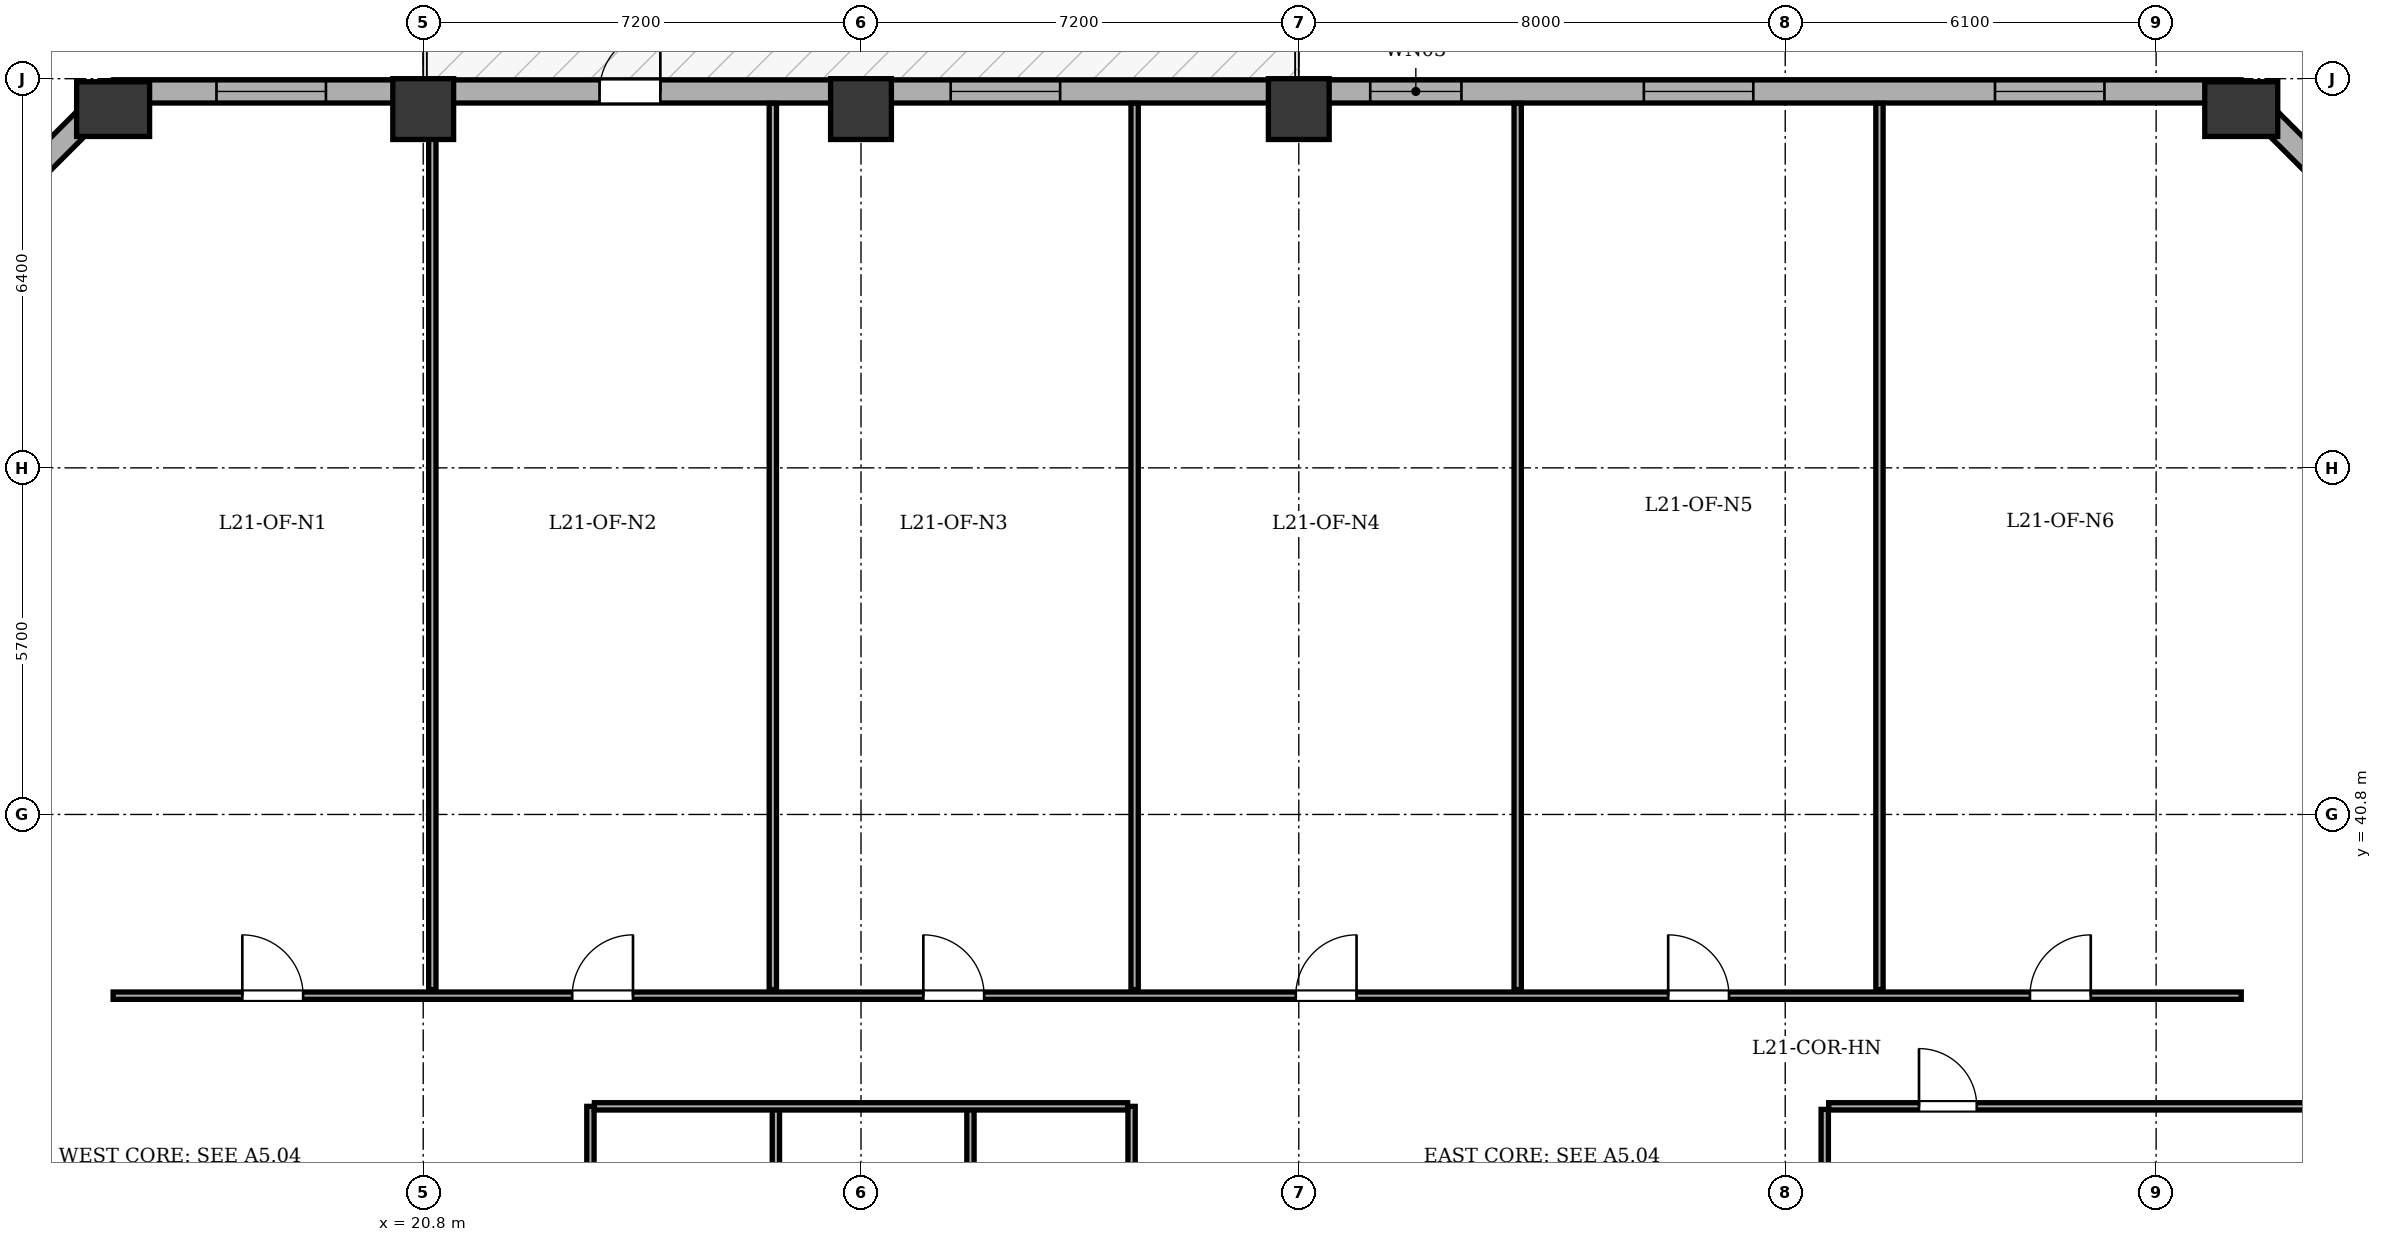
"""IFC4 building model, lengths in metres.
Left out: names, types, materials, properties, quantities, classifications, styles, units other than length and angle.
Written with IfcOpenShell. Run it as: python <this file> out.ifc"""

import sys

from ifc_helpers import new_model, si_unit, direction, frame, frame_2d, origin, origin_2d, place, context, subcontext, project, spatial, rectangle, extrude, element, fill, save


model = new_model("IFC4")
c1 = context("Model", 3, precision=1e-05, world=origin(), true_north=direction((0.0, 1.0)))
c2 = subcontext(c1, "Body", "Model", "MODEL_VIEW")
j1 = project(units=[si_unit("LENGTHUNIT", "METRE"), si_unit("PLANEANGLEUNIT", "RADIAN")], contexts=[c1])
p1 = place(None, origin())
s1 = spatial("IfcSite", under=j1, at=p1, CompositionType="ELEMENT")
p2 = place(p1, origin())
s2 = spatial("IfcBuilding", under=s1, at=p2, CompositionType="ELEMENT")
p3 = place(p2, frame((0.0, 0.0, 86.7)))
s3 = spatial("IfcBuildingStorey", under=s2, at=p3, CompositionType="ELEMENT", Elevation=86.7)
p4 = place(p3, frame((15.7, 52.4, 0.0), z_axis=(0.0, 0.0, 1.0), x_axis=(1.0, 0.0, 0.0)))
e1 = element("IfcColumn", 1, at=p4, inside=s3, PredefinedType="COLUMN", context=c2, shape_type="SweptSolid", body=[
    extrude(rectangle(XDim=0.9, YDim=1.2, at=origin_2d()), origin(), (0.0, 0.0, 1.0), 3.9),
])
for number, where, z_axis, x_axis in (
    (2, (20.8, 52.4, 0.0), (0.0, 0.0, 1.0), (1.0, 0.0, 0.0)),
    (3, (28.0, 52.4, 0.0), (0.0, 0.0, 1.0), (1.0, 0.0, 0.0)),
    (4, (35.2, 52.4, 0.0), (0.0, 0.0, 1.0), (1.0, 0.0, 0.0)),
):
    element("IfcColumn", number, at=place(p3, frame(where, z_axis=z_axis, x_axis=x_axis)), inside=s3, PredefinedType="COLUMN", context=c2, shape_type="SweptSolid", body=[
        extrude(rectangle(XDim=1.0, YDim=1.0, at=origin_2d()), origin(), (0.0, 0.0, 1.0), 3.9),
    ])
p5 = place(p3, frame((50.7, 52.4, 0.0), z_axis=(0.0, 0.0, 1.0), x_axis=(1.0, 0.0, 0.0)))
e5 = element("IfcColumn", 5, at=p5, inside=s3, PredefinedType="COLUMN", context=c2, shape_type="SweptSolid", body=[
    extrude(rectangle(XDim=0.9, YDim=1.2, at=origin_2d()), origin(), (0.0, 0.0, 1.0), 3.9),
])
p6 = place(p3, frame((10.91, 47.9, 0.0), z_axis=(0.0, 0.0, 1.0), x_axis=(0.707106781187, 0.707106781187, 0.0)))
e6 = element("IfcWall", 6, at=p6, inside=s3, PredefinedType="STANDARD", context=c2, shape_type="SweptSolid", body=[
    extrude(rectangle(XDim=6.774, YDim=0.38, at=frame_2d((3.387, 0.0))), origin(), (0.0, 0.0, 1.0), 3.135),
])
p7 = place(p6, frame((2.687, 0.0, 0.8)))
e7 = element("IfcOpeningElement", 7, at=p7, cuts=e6, PredefinedType="OPENING", context=c2, shape_type="SweptSolid", body=[
    extrude(rectangle(XDim=1.4, YDim=1.65, at=frame_2d((0.7, 0.825))), frame((0.0, 0.2, 0.0), z_axis=(0.0, -1.0, 0.0), x_axis=(1.0, 0.0, 0.0)), (0.0, 0.0, 1.0), 0.4),
])
p8 = place(p3, frame((15.7, 52.69, 0.0), z_axis=(0.0, 0.0, 1.0), x_axis=(1.0, 0.0, 0.0)))
e8 = element("IfcWall", 8, at=p8, inside=s3, PredefinedType="STANDARD", context=c2, shape_type="SweptSolid", body=[
    extrude(rectangle(XDim=35.0, YDim=0.38, at=frame_2d((17.5, 0.0))), origin(), (0.0, 0.0, 1.0), 3.135),
])
p9 = place(p8, frame((8.0, 0.0, 0.0)))
e9 = element("IfcOpeningElement", 9, at=p9, cuts=e8, PredefinedType="OPENING", context=c2, shape_type="SweptSolid", body=[
    extrude(rectangle(XDim=1.0, YDim=2.02, at=frame_2d((0.5, 1.01))), frame((0.0, 0.2, 0.0), z_axis=(0.0, -1.0, 0.0), x_axis=(1.0, 0.0, 0.0)), (0.0, 0.0, 1.0), 0.4),
])
p10 = place(p8, frame((1.7, 0.0, 0.8)))
e10 = element("IfcOpeningElement", 10, at=p10, cuts=e8, PredefinedType="OPENING", context=c2, shape_type="SweptSolid", body=[
    extrude(rectangle(XDim=1.8, YDim=1.9, at=frame_2d((0.9, 0.95))), frame((0.0, 0.2, 0.0), z_axis=(0.0, -1.0, 0.0), x_axis=(1.0, 0.0, 0.0)), (0.0, 0.0, 1.0), 0.4),
])
p11 = place(p8, frame((13.775, 0.0, 0.8)))
e11 = element("IfcOpeningElement", 11, at=p11, cuts=e8, PredefinedType="OPENING", context=c2, shape_type="SweptSolid", body=[
    extrude(rectangle(XDim=1.8, YDim=1.9, at=frame_2d((0.9, 0.95))), frame((0.0, 0.2, 0.0), z_axis=(0.0, -1.0, 0.0), x_axis=(1.0, 0.0, 0.0)), (0.0, 0.0, 1.0), 0.4),
])
p12 = place(p8, frame((20.675, 0.0, 0.8)))
e12 = element("IfcOpeningElement", 12, at=p12, cuts=e8, PredefinedType="OPENING", context=c2, shape_type="SweptSolid", body=[
    extrude(rectangle(XDim=1.5, YDim=1.9, at=frame_2d((0.75, 0.95))), frame((0.0, 0.2, 0.0), z_axis=(0.0, -1.0, 0.0), x_axis=(1.0, 0.0, 0.0)), (0.0, 0.0, 1.0), 0.4),
])
p13 = place(p8, frame((25.175, 0.0, 0.8)))
e13 = element("IfcOpeningElement", 13, at=p13, cuts=e8, PredefinedType="OPENING", context=c2, shape_type="SweptSolid", body=[
    extrude(rectangle(XDim=1.8, YDim=1.9, at=frame_2d((0.9, 0.95))), frame((0.0, 0.2, 0.0), z_axis=(0.0, -1.0, 0.0), x_axis=(1.0, 0.0, 0.0)), (0.0, 0.0, 1.0), 0.4),
])
p14 = place(p8, frame((30.95, 0.0, 0.8)))
e14 = element("IfcOpeningElement", 14, at=p14, cuts=e8, PredefinedType="OPENING", context=c2, shape_type="SweptSolid", body=[
    extrude(rectangle(XDim=1.8, YDim=1.9, at=frame_2d((0.9, 0.95))), frame((0.0, 0.2, 0.0), z_axis=(0.0, -1.0, 0.0), x_axis=(1.0, 0.0, 0.0)), (0.0, 0.0, 1.0), 0.4),
])
p15 = place(p3, frame((50.7, 52.69, 0.0), z_axis=(0.0, 0.0, 1.0), x_axis=(0.707106781187, -0.707106781187, 0.0)))
e15 = element("IfcWall", 15, at=p15, inside=s3, PredefinedType="STANDARD", context=c2, shape_type="SweptSolid", body=[
    extrude(rectangle(XDim=6.774, YDim=0.38, at=frame_2d((3.387, 0.0))), origin(), (0.0, 0.0, 1.0), 3.135),
])
p16 = place(p15, frame((2.687, 0.0, 0.8)))
e16 = element("IfcOpeningElement", 16, at=p16, cuts=e15, PredefinedType="OPENING", context=c2, shape_type="SweptSolid", body=[
    extrude(rectangle(XDim=1.4, YDim=1.65, at=frame_2d((0.7, 0.825))), frame((0.0, 0.2, 0.0), z_axis=(0.0, -1.0, 0.0), x_axis=(1.0, 0.0, 0.0)), (0.0, 0.0, 1.0), 0.4),
])
for number, where, z_axis, x_axis in (
    (17, (23.55, 24.715, 0.0), (0.0, 0.0, 1.0), (0.0, 1.0, 0.0)),
    (18, (32.45, 24.715, 0.0), (0.0, 0.0, 1.0), (0.0, 1.0, 0.0)),
    (19, (26.6, 24.715, 0.0), (0.0, 0.0, 1.0), (0.0, 1.0, 0.0)),
):
    element("IfcWall", number, at=place(p3, frame(where, z_axis=z_axis, x_axis=x_axis)), inside=s3, PredefinedType="PARTITIONING", context=c2, shape_type="SweptSolid", body=[
        extrude(rectangle(XDim=11.285, YDim=0.12, at=frame_2d((5.643, 0.0))), origin(), (0.0, 0.0, 1.0), 3.6),
    ])
p17 = place(p3, frame((29.8, 24.715, 0.0), z_axis=(0.0, 0.0, 1.0), x_axis=(0.0, 1.0, 0.0)))
e20 = element("IfcWall", 20, at=p17, inside=s3, PredefinedType="PARTITIONING", context=c2, shape_type="SweptSolid", body=[
    extrude(rectangle(XDim=11.285, YDim=0.12, at=frame_2d((5.643, 0.0))), origin(), (0.0, 0.0, 1.0), 3.135),
])
p18 = place(p3, frame((23.615, 36.0, 0.0), z_axis=(0.0, 0.0, 1.0), x_axis=(1.0, 0.0, 0.0)))
e21 = element("IfcWall", 21, at=p18, inside=s3, PredefinedType="PARTITIONING", context=c2, shape_type="SweptSolid", body=[
    extrude(rectangle(XDim=8.77, YDim=0.12, at=frame_2d((4.385, 0.0))), origin(), (0.0, 0.0, 1.0), 3.6),
])
p19 = place(p3, frame((15.7, 37.82, 0.0), z_axis=(0.0, 0.0, 1.0), x_axis=(1.0, 0.0, 0.0)))
e22 = element("IfcWall", 22, at=p19, inside=s3, PredefinedType="PARTITIONING", context=c2, shape_type="SweptSolid", body=[
    extrude(rectangle(XDim=35.0, YDim=0.12, at=frame_2d((17.5, 0.0))), origin(), (0.0, 0.0, 1.0), 3.6),
])
p20 = place(p19, frame((2.125, 0.0, 0.0)))
e23 = element("IfcOpeningElement", 23, at=p20, cuts=e22, PredefinedType="OPENING", context=c2, shape_type="SweptSolid", body=[
    extrude(rectangle(XDim=1.0, YDim=2.1, at=frame_2d((0.5, 1.05))), frame((0.0, 0.07, 0.0), z_axis=(0.0, -1.0, 0.0), x_axis=(1.0, 0.0, 0.0)), (0.0, 0.0, 1.0), 0.14),
])
p21 = place(p19, frame((7.55, 0.0, 0.0)))
e24 = element("IfcOpeningElement", 24, at=p21, cuts=e22, PredefinedType="OPENING", context=c2, shape_type="SweptSolid", body=[
    extrude(rectangle(XDim=1.0, YDim=2.1, at=frame_2d((0.5, 1.05))), frame((0.0, 0.07, 0.0), z_axis=(0.0, -1.0, 0.0), x_axis=(1.0, 0.0, 0.0)), (0.0, 0.0, 1.0), 0.14),
])
p22 = place(p19, frame((13.325, 0.0, 0.0)))
e25 = element("IfcOpeningElement", 25, at=p22, cuts=e22, PredefinedType="OPENING", context=c2, shape_type="SweptSolid", body=[
    extrude(rectangle(XDim=1.0, YDim=2.1, at=frame_2d((0.5, 1.05))), frame((0.0, 0.07, 0.0), z_axis=(0.0, -1.0, 0.0), x_axis=(1.0, 0.0, 0.0)), (0.0, 0.0, 1.0), 0.14),
])
p23 = place(p19, frame((19.45, 0.0, 0.0)))
e26 = element("IfcOpeningElement", 26, at=p23, cuts=e22, PredefinedType="OPENING", context=c2, shape_type="SweptSolid", body=[
    extrude(rectangle(XDim=1.0, YDim=2.1, at=frame_2d((0.5, 1.05))), frame((0.0, 0.07, 0.0), z_axis=(0.0, -1.0, 0.0), x_axis=(1.0, 0.0, 0.0)), (0.0, 0.0, 1.0), 0.14),
])
p24 = place(p19, frame((25.575, 0.0, 0.0)))
e27 = element("IfcOpeningElement", 27, at=p24, cuts=e22, PredefinedType="OPENING", context=c2, shape_type="SweptSolid", body=[
    extrude(rectangle(XDim=1.0, YDim=2.1, at=frame_2d((0.5, 1.05))), frame((0.0, 0.07, 0.0), z_axis=(0.0, -1.0, 0.0), x_axis=(1.0, 0.0, 0.0)), (0.0, 0.0, 1.0), 0.14),
])
p25 = place(p19, frame((31.525, 0.0, 0.0)))
e28 = element("IfcOpeningElement", 28, at=p25, cuts=e22, PredefinedType="OPENING", context=c2, shape_type="SweptSolid", body=[
    extrude(rectangle(XDim=1.0, YDim=2.1, at=frame_2d((0.5, 1.05))), frame((0.0, 0.07, 0.0), z_axis=(0.0, -1.0, 0.0), x_axis=(1.0, 0.0, 0.0)), (0.0, 0.0, 1.0), 0.14),
])
p26 = place(p3, frame((20.95, 37.92, 0.0), z_axis=(0.0, 0.0, 1.0), x_axis=(0.0, 1.0, 0.0)))
e29 = element("IfcWall", 29, at=p26, inside=s3, PredefinedType="PARTITIONING", context=c2, shape_type="SweptSolid", body=[
    extrude(rectangle(XDim=14.575, YDim=0.12, at=frame_2d((7.288, 0.0))), origin(), (0.0, 0.0, 1.0), 2.835),
])
for number, where, z_axis, x_axis in (
    (30, (26.55, 37.92, 0.0), (0.0, 0.0, 1.0), (0.0, 1.0, 0.0)),
    (31, (32.5, 37.92, 0.0), (0.0, 0.0, 1.0), (0.0, 1.0, 0.0)),
    (32, (38.8, 37.92, 0.0), (0.0, 0.0, 1.0), (0.0, 1.0, 0.0)),
    (33, (44.75, 37.92, 0.0), (0.0, 0.0, 1.0), (0.0, 1.0, 0.0)),
):
    element("IfcWall", number, at=place(p3, frame(where, z_axis=z_axis, x_axis=x_axis)), inside=s3, PredefinedType="PARTITIONING", context=c2, shape_type="SweptSolid", body=[
        extrude(rectangle(XDim=14.575, YDim=0.12, at=frame_2d((7.288, 0.0))), origin(), (0.0, 0.0, 1.0), 3.6),
    ])
p27 = place(p3, frame((43.85, 18.45, 0.0), z_axis=(0.0, 0.0, 1.0), x_axis=(0.0, 1.0, 0.0)))
e34 = element("IfcWall", 34, at=p27, inside=s3, PredefinedType="PARTITIONING", context=c2, shape_type="SweptSolid", body=[
    extrude(rectangle(XDim=17.5, YDim=0.12, at=frame_2d((8.75, 0.0))), origin(), (0.0, 0.0, 1.0), 3.6),
])
p28 = place(p3, frame((43.915, 36.0, 0.0), z_axis=(0.0, 0.0, 1.0), x_axis=(1.0, 0.0, 0.0)))
e35 = element("IfcWall", 35, at=p28, inside=s3, PredefinedType="PARTITIONING", context=c2, shape_type="SweptSolid", body=[
    extrude(rectangle(XDim=11.38, YDim=0.12, at=frame_2d((5.69, 0.0))), origin(), (0.0, 0.0, 1.0), 3.6),
])
p29 = place(p28, frame((1.485, 0.0, 0.0)))
e36 = element("IfcOpeningElement", 36, at=p29, cuts=e35, PredefinedType="OPENING", context=c2, shape_type="SweptSolid", body=[
    extrude(rectangle(XDim=0.95, YDim=2.1, at=frame_2d((0.475, 1.05))), frame((0.0, 0.07, 0.0), z_axis=(0.0, -1.0, 0.0), x_axis=(1.0, 0.0, 0.0)), (0.0, 0.0, 1.0), 0.14),
])
p30 = place(p9, origin())
e37 = element("IfcDoor", 37, at=p30, inside=s3, OperationType="SINGLE_SWING_RIGHT", PredefinedType="DOOR", context=c2, shape_type="SweptSolid", body=[
    extrude(rectangle(XDim=1.0, YDim=2.02, at=frame_2d((0.5, 1.01))), frame((0.0, 0.025, 0.0), z_axis=(0.0, -1.0, 0.0), x_axis=(1.0, 0.0, 0.0)), (0.0, 0.0, 1.0), 0.05),
])
fill(e9, e37)
p31 = place(p10, origin())
e38 = element("IfcWindow", 38, at=p31, inside=s3, PartitioningType="SINGLE_PANEL", PredefinedType="WINDOW", context=c2, shape_type="SweptSolid", body=[
    extrude(rectangle(XDim=1.8, YDim=1.9, at=frame_2d((0.9, 0.95))), frame((0.0, -0.01, 0.0), z_axis=(0.0, -1.0, 0.0), x_axis=(1.0, 0.0, 0.0)), (0.0, 0.0, 1.0), 0.06),
])
fill(e10, e38)
p32 = place(p11, origin())
e39 = element("IfcWindow", 39, at=p32, inside=s3, PartitioningType="SINGLE_PANEL", PredefinedType="WINDOW", context=c2, shape_type="SweptSolid", body=[
    extrude(rectangle(XDim=1.8, YDim=1.9, at=frame_2d((0.9, 0.95))), frame((0.0, -0.01, 0.0), z_axis=(0.0, -1.0, 0.0), x_axis=(1.0, 0.0, 0.0)), (0.0, 0.0, 1.0), 0.06),
])
fill(e11, e39)
p33 = place(p12, origin())
e40 = element("IfcWindow", 40, at=p33, inside=s3, PartitioningType="SINGLE_PANEL", PredefinedType="WINDOW", context=c2, shape_type="SweptSolid", body=[
    extrude(rectangle(XDim=1.5, YDim=1.9, at=frame_2d((0.75, 0.95))), frame((0.0, -0.01, 0.0), z_axis=(0.0, -1.0, 0.0), x_axis=(1.0, 0.0, 0.0)), (0.0, 0.0, 1.0), 0.06),
])
fill(e12, e40)
p34 = place(p13, origin())
e41 = element("IfcWindow", 41, at=p34, inside=s3, PartitioningType="SINGLE_PANEL", PredefinedType="WINDOW", context=c2, shape_type="SweptSolid", body=[
    extrude(rectangle(XDim=1.8, YDim=1.9, at=frame_2d((0.9, 0.95))), frame((0.0, -0.01, 0.0), z_axis=(0.0, -1.0, 0.0), x_axis=(1.0, 0.0, 0.0)), (0.0, 0.0, 1.0), 0.06),
])
fill(e13, e41)
p35 = place(p14, origin())
e42 = element("IfcWindow", 42, at=p35, inside=s3, PartitioningType="SINGLE_PANEL", PredefinedType="WINDOW", context=c2, shape_type="SweptSolid", body=[
    extrude(rectangle(XDim=1.8, YDim=1.9, at=frame_2d((0.9, 0.95))), frame((0.0, -0.01, 0.0), z_axis=(0.0, -1.0, 0.0), x_axis=(1.0, 0.0, 0.0)), (0.0, 0.0, 1.0), 0.06),
])
fill(e14, e42)
p36 = place(p20, origin())
e43 = element("IfcDoor", 43, at=p36, inside=s3, OperationType="SINGLE_SWING_LEFT", PredefinedType="DOOR", context=c2, shape_type="SweptSolid", body=[
    extrude(rectangle(XDim=1.0, YDim=2.1, at=frame_2d((0.5, 1.05))), frame((0.0, 0.025, 0.0), z_axis=(0.0, -1.0, 0.0), x_axis=(1.0, 0.0, 0.0)), (0.0, 0.0, 1.0), 0.05),
])
fill(e23, e43)
p37 = place(p21, origin())
e44 = element("IfcDoor", 44, at=p37, inside=s3, OperationType="SINGLE_SWING_RIGHT", PredefinedType="DOOR", context=c2, shape_type="SweptSolid", body=[
    extrude(rectangle(XDim=1.0, YDim=2.1, at=frame_2d((0.5, 1.05))), frame((0.0, 0.025, 0.0), z_axis=(0.0, -1.0, 0.0), x_axis=(1.0, 0.0, 0.0)), (0.0, 0.0, 1.0), 0.05),
])
fill(e24, e44)
p38 = place(p22, origin())
e45 = element("IfcDoor", 45, at=p38, inside=s3, OperationType="SINGLE_SWING_LEFT", PredefinedType="DOOR", context=c2, shape_type="SweptSolid", body=[
    extrude(rectangle(XDim=1.0, YDim=2.1, at=frame_2d((0.5, 1.05))), frame((0.0, 0.025, 0.0), z_axis=(0.0, -1.0, 0.0), x_axis=(1.0, 0.0, 0.0)), (0.0, 0.0, 1.0), 0.05),
])
fill(e25, e45)
p39 = place(p23, origin())
e46 = element("IfcDoor", 46, at=p39, inside=s3, OperationType="SINGLE_SWING_RIGHT", PredefinedType="DOOR", context=c2, shape_type="SweptSolid", body=[
    extrude(rectangle(XDim=1.0, YDim=2.1, at=frame_2d((0.5, 1.05))), frame((0.0, 0.025, 0.0), z_axis=(0.0, -1.0, 0.0), x_axis=(1.0, 0.0, 0.0)), (0.0, 0.0, 1.0), 0.05),
])
fill(e26, e46)
p40 = place(p24, origin())
e47 = element("IfcDoor", 47, at=p40, inside=s3, OperationType="SINGLE_SWING_LEFT", PredefinedType="DOOR", context=c2, shape_type="SweptSolid", body=[
    extrude(rectangle(XDim=1.0, YDim=2.1, at=frame_2d((0.5, 1.05))), frame((0.0, 0.025, 0.0), z_axis=(0.0, -1.0, 0.0), x_axis=(1.0, 0.0, 0.0)), (0.0, 0.0, 1.0), 0.05),
])
fill(e27, e47)
p41 = place(p25, origin())
e48 = element("IfcDoor", 48, at=p41, inside=s3, OperationType="SINGLE_SWING_RIGHT", PredefinedType="DOOR", context=c2, shape_type="SweptSolid", body=[
    extrude(rectangle(XDim=1.0, YDim=2.1, at=frame_2d((0.5, 1.05))), frame((0.0, 0.025, 0.0), z_axis=(0.0, -1.0, 0.0), x_axis=(1.0, 0.0, 0.0)), (0.0, 0.0, 1.0), 0.05),
])
fill(e28, e48)
p42 = place(p29, origin())
e49 = element("IfcDoor", 49, at=p42, inside=s3, OperationType="SINGLE_SWING_LEFT", PredefinedType="DOOR", context=c2, shape_type="SweptSolid", body=[
    extrude(rectangle(XDim=0.95, YDim=2.1, at=frame_2d((0.475, 1.05))), frame((0.0, 0.025, 0.0), z_axis=(0.0, -1.0, 0.0), x_axis=(1.0, 0.0, 0.0)), (0.0, 0.0, 1.0), 0.05),
])
fill(e36, e49)
save(model, sys.argv[1])
